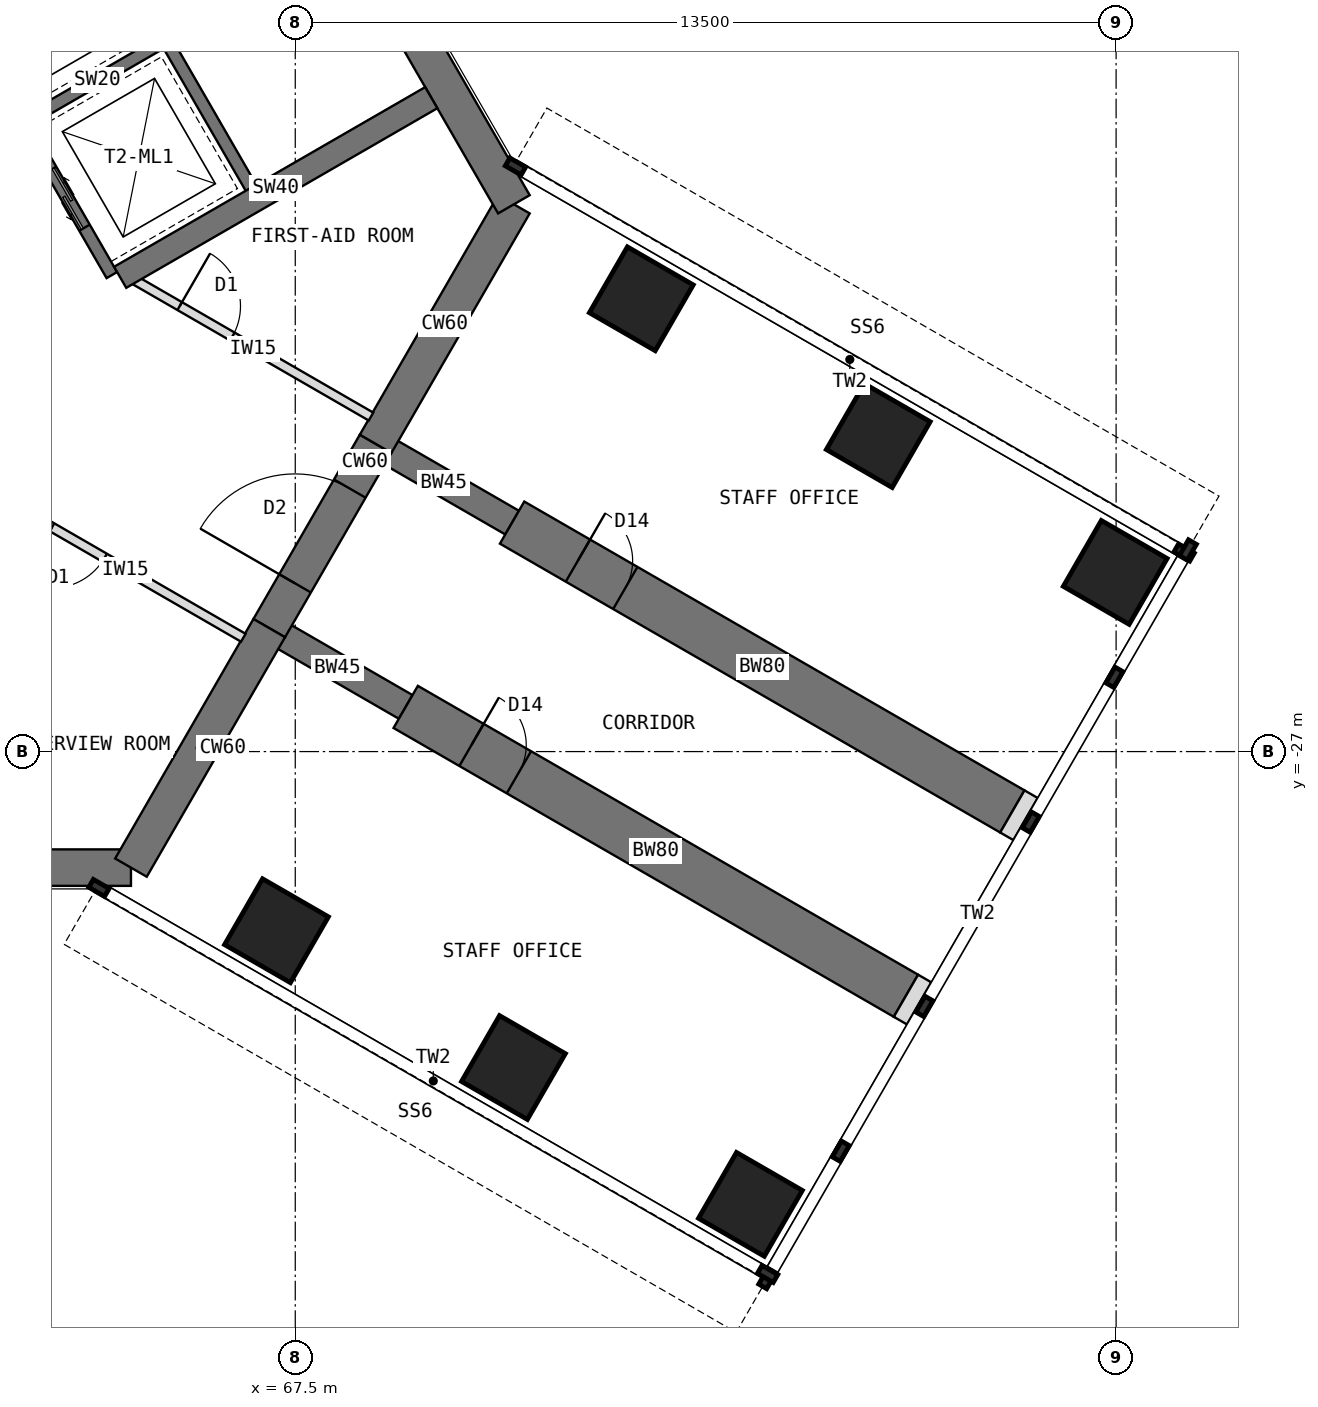
"""IFC4 building model, lengths in metres.
Left out: names, types, materials, properties, quantities, classifications, styles, units other than length and angle.
Written with IfcOpenShell. Run it as: python <this file> out.ifc"""

import sys

from ifc_helpers import new_model, si_unit, direction, frame, frame_2d, origin, origin_2d, place, context, subcontext, project, spatial, rectangle, extrude, element, fill, save


model = new_model("IFC4")
c1 = context("Model", 3, precision=1e-05, world=origin(), true_north=direction((0.0, 1.0)))
c2 = subcontext(c1, "Body", "Model", "MODEL_VIEW")
j1 = project(units=[si_unit("LENGTHUNIT", "METRE"), si_unit("PLANEANGLEUNIT", "RADIAN")], contexts=[c1])
p1 = place(None, origin())
s1 = spatial("IfcSite", under=j1, at=p1, CompositionType="ELEMENT")
p2 = place(p1, origin())
s2 = spatial("IfcBuilding", under=s1, at=p2, CompositionType="ELEMENT")
p3 = place(p2, frame((0.0, 0.0, 161.5)))
s3 = spatial("IfcBuildingStorey", under=s2, at=p3, CompositionType="ELEMENT", Elevation=161.5)
p4 = place(p3, frame((52.202, -28.908, 0.0), z_axis=(0.0, 0.0, 1.0), x_axis=(1.0, 0.0, 0.0)))
e1 = element("IfcWall", 1, at=p4, inside=s3, PredefinedType="SHEAR", context=c2, shape_type="SweptSolid", body=[
    extrude(rectangle(XDim=12.596, YDim=0.6, at=frame_2d((6.298, 0.0))), origin(), (0.0, 0.0, 1.0), 4.0),
])
p5 = place(p3, frame((64.798, -28.908, 0.0), z_axis=(0.0, 0.0, 1.0), x_axis=(0.499984222037, 0.866034513004, 0.0)))
e2 = element("IfcWall", 2, at=p5, inside=s3, PredefinedType="SHEAR", context=c2, shape_type="SweptSolid", body=[
    extrude(rectangle(XDim=4.548, YDim=0.6, at=frame_2d((2.274, 0.0))), origin(), (0.0, 0.0, 1.0), 4.0),
])
p6 = place(p3, frame((67.072, -24.97, 0.0), z_axis=(0.0, 0.0, 1.0), x_axis=(0.500010275428, 0.866019471182, 0.0)))
e3 = element("IfcWall", 3, at=p6, inside=s3, PredefinedType="SHEAR", context=c2, shape_type="SweptSolid", body=[
    extrude(rectangle(XDim=3.5, YDim=0.6, at=frame_2d((1.75, 0.0))), origin(), (0.0, 0.0, 1.0), 4.0),
])
p7 = place(p6, frame((0.85, 0.0, 0.0)))
e4 = element("IfcOpeningElement", 4, at=p7, cuts=e3, PredefinedType="OPENING", context=c2, shape_type="SweptSolid", body=[
    extrude(rectangle(XDim=1.8, YDim=2.1, at=frame_2d((0.9, 1.05))), frame((0.0, 0.31, 0.0), z_axis=(0.0, -1.0, 0.0), x_axis=(1.0, 0.0, 0.0)), (0.0, 0.0, 1.0), 0.62),
])
p8 = place(p3, frame((68.822, -21.939, 0.0), z_axis=(0.0, 0.0, 1.0), x_axis=(0.500024481964, 0.866011268655, 0.0)))
e5 = element("IfcWall", 5, at=p8, inside=s3, PredefinedType="SHEAR", context=c2, shape_type="SweptSolid", body=[
    extrude(rectangle(XDim=4.548, YDim=0.6, at=frame_2d((2.274, 0.0))), origin(), (0.0, 0.0, 1.0), 4.0),
])
p9 = place(p3, frame((71.096, -18.0, 0.0), z_axis=(0.0, 0.0, 1.0), x_axis=(-0.500005998175, 0.866021940709, 0.0)))
e6 = element("IfcWall", 6, at=p9, inside=s3, PredefinedType="SHEAR", context=c2, shape_type="SweptSolid", body=[
    extrude(rectangle(XDim=12.596, YDim=0.6, at=frame_2d((6.298, 0.0))), origin(), (0.0, 0.0, 1.0), 4.0),
])
p10 = place(p3, frame((68.822, -21.939, 0.0), z_axis=(0.0, 0.0, 1.0), x_axis=(0.866072649678, -0.499918158782, 0.0)))
e7 = element("IfcWall", 7, at=p10, inside=s3, PredefinedType="SHEAR", context=c2, shape_type="SweptSolid", body=[
    extrude(rectangle(XDim=2.592, YDim=0.45, at=frame_2d((1.296, 0.0))), origin(), (0.0, 0.0, 1.0), 4.0),
])
p11 = place(p3, frame((71.066, -23.234, 0.0), z_axis=(0.0, 0.0, 1.0), x_axis=(0.86602681393, -0.499997557548, 0.0)))
e8 = element("IfcWall", 8, at=p11, inside=s3, PredefinedType="SHEAR", context=c2, shape_type="SweptSolid", body=[
    extrude(rectangle(XDim=9.5, YDim=0.8, at=frame_2d((4.75, 0.0))), origin(), (0.0, 0.0, 1.0), 4.0),
])
p12 = place(p11, frame((1.25, 0.0, 0.0)))
e9 = element("IfcOpeningElement", 9, at=p12, cuts=e8, PredefinedType="OPENING", context=c2, shape_type="SweptSolid", body=[
    extrude(rectangle(XDim=0.9, YDim=2.1, at=frame_2d((0.45, 1.05))), frame((0.0, 0.41, 0.0), z_axis=(0.0, -1.0, 0.0), x_axis=(1.0, 0.0, 0.0)), (0.0, 0.0, 1.0), 0.82),
])
p13 = place(p3, frame((67.072, -24.97, 0.0), z_axis=(0.0, 0.0, 1.0), x_axis=(0.866031863473, -0.499988811324, 0.0)))
e10 = element("IfcWall", 10, at=p13, inside=s3, PredefinedType="SHEAR", context=c2, shape_type="SweptSolid", body=[
    extrude(rectangle(XDim=2.592, YDim=0.45, at=frame_2d((1.296, 0.0))), origin(), (0.0, 0.0, 1.0), 4.0),
])
p14 = place(p3, frame((69.316, -26.266, 0.0), z_axis=(0.0, 0.0, 1.0), x_axis=(0.86602681393, -0.499997557548, 0.0)))
e11 = element("IfcWall", 11, at=p14, inside=s3, PredefinedType="SHEAR", context=c2, shape_type="SweptSolid", body=[
    extrude(rectangle(XDim=9.5, YDim=0.8, at=frame_2d((4.75, 0.0))), origin(), (0.0, 0.0, 1.0), 4.0),
])
p15 = place(p14, frame((1.25, 0.0, 0.0)))
e12 = element("IfcOpeningElement", 12, at=p15, cuts=e11, PredefinedType="OPENING", context=c2, shape_type="SweptSolid", body=[
    extrude(rectangle(XDim=0.9, YDim=2.1, at=frame_2d((0.45, 1.05))), frame((0.0, 0.41, 0.0), z_axis=(0.0, -1.0, 0.0), x_axis=(1.0, 0.0, 0.0)), (0.0, 0.0, 1.0), 0.82),
])
for number, where, z_axis, x_axis in (
    (13, (73.191, -19.554, 0.0), (0.0, 0.0, 1.0), (0.5, 0.866, 0.0)),
    (14, (67.191, -29.946, 0.0), (0.0, 0.0, 1.0), (0.5, 0.866, 0.0)),
    (15, (77.088, -21.804, 0.0), (0.0, 0.0, 1.0), (0.5, 0.866, 0.0)),
    (16, (71.088, -32.196, 0.0), (0.0, 0.0, 1.0), (0.5, 0.866, 0.0)),
    (17, (80.986, -24.054, 0.0), (0.0, 0.0, 1.0), (0.5, 0.866, 0.0)),
    (18, (74.986, -34.446, 0.0), (0.0, 0.0, 1.0), (0.5, 0.866, 0.0)),
):
    element("IfcColumn", number, at=place(p3, frame(where, z_axis=z_axis, x_axis=x_axis)), inside=s3, PredefinedType="COLUMN", context=c2, shape_type="SweptSolid", body=[
        extrude(rectangle(XDim=1.25, YDim=1.25, at=origin_2d()), origin(), (0.0, 0.0, 1.0), 4.0),
    ])
for number, where, z_axis, x_axis in (
    (19, (79.294, -27.984, 0.0), (0.0, 0.0, 1.0), (0.866, -0.5, 0.0)),
    (20, (77.544, -31.016, 0.0), (0.0, 0.0, 1.0), (0.866, -0.5, 0.0)),
):
    element("IfcWall", number, at=place(p3, frame(where, z_axis=z_axis, x_axis=x_axis)), inside=s3, PredefinedType="PARTITIONING", context=c2, shape_type="SweptSolid", body=[
        extrude(rectangle(XDim=0.25, YDim=0.8, at=frame_2d((0.125, 0.0))), origin(), (0.0, 0.0, 1.0), 3.7),
    ])
p16 = place(p3, frame((64.484, -19.164, 0.0), z_axis=(0.0, 0.0, 1.0), x_axis=(-0.49999894854, 0.866026010844, 0.0)))
e21 = element("IfcWall", 21, at=p16, inside=s3, PredefinedType="SHEAR", context=c2, shape_type="SweptSolid", body=[
    extrude(rectangle(XDim=8.0, YDim=0.2, at=frame_2d((4.0, 0.0))), origin(), (0.0, 0.0, 1.0), 4.0),
])
p17 = place(p16, frame((6.3, 0.0, 0.0)))
e22 = element("IfcOpeningElement", 22, at=p17, cuts=e21, PredefinedType="OPENING", context=c2, shape_type="SweptSolid", body=[
    extrude(rectangle(XDim=1.2, YDim=2.1, at=frame_2d((0.6, 1.05))), frame((0.0, 0.11, 0.0), z_axis=(0.0, -1.0, 0.0), x_axis=(1.0, 0.0, 0.0)), (0.0, 0.0, 1.0), 0.22),
])
p18 = place(p16, frame((0.9, 0.0, 0.0)))
e23 = element("IfcOpeningElement", 23, at=p18, cuts=e21, PredefinedType="OPENING", context=c2, shape_type="SweptSolid", body=[
    extrude(rectangle(XDim=1.1, YDim=2.2, at=frame_2d((0.55, 1.1))), frame((0.0, 0.11, 0.0), z_axis=(0.0, -1.0, 0.0), x_axis=(1.0, 0.0, 0.0)), (0.0, 0.0, 1.0), 0.22),
])
p19 = place(p16, frame((3.8, 0.0, 0.0)))
e24 = element("IfcOpeningElement", 24, at=p19, cuts=e21, PredefinedType="OPENING", context=c2, shape_type="SweptSolid", body=[
    extrude(rectangle(XDim=1.1, YDim=2.2, at=frame_2d((0.55, 1.1))), frame((0.0, 0.11, 0.0), z_axis=(0.0, -1.0, 0.0), x_axis=(1.0, 0.0, 0.0)), (0.0, 0.0, 1.0), 0.22),
])
p20 = place(p3, frame((63.12, -16.603, 0.0), z_axis=(0.0, 0.0, 1.0), x_axis=(0.866062058628, 0.499936506574, 0.0)))
e25 = element("IfcWall", 25, at=p20, inside=s3, PredefinedType="SHEAR", context=c2, shape_type="SweptSolid", body=[
    extrude(rectangle(XDim=2.6, YDim=0.2, at=frame_2d((1.3, 0.0))), origin(), (0.0, 0.0, 1.0), 4.0),
])
p21 = place(p3, frame((66.822, -17.814, 0.0), z_axis=(0.0, 0.0, 1.0), x_axis=(-0.49999894854, 0.866026010844, 0.0)))
e26 = element("IfcWall", 26, at=p21, inside=s3, PredefinedType="SHEAR", context=c2, shape_type="SweptSolid", body=[
    extrude(rectangle(XDim=8.0, YDim=0.2, at=frame_2d((4.0, 0.0))), origin(), (0.0, 0.0, 1.0), 4.0),
])
p22 = place(p21, frame((6.7, 0.0, 0.0)))
e27 = element("IfcOpeningElement", 27, at=p22, cuts=e26, PredefinedType="OPENING", context=c2, shape_type="SweptSolid", body=[
    extrude(rectangle(XDim=1.1, YDim=2.1, at=frame_2d((0.55, 1.05))), frame((0.0, 0.11, 0.0), z_axis=(0.0, -1.0, 0.0), x_axis=(1.0, 0.0, 0.0)), (0.0, 0.0, 1.0), 0.22),
])
p23 = place(p3, frame((64.62, -19.201, 0.0), z_axis=(0.0, 0.0, 1.0), x_axis=(0.866027317282, 0.49999668571, 0.0)))
e28 = element("IfcWall", 28, at=p23, inside=s3, PredefinedType="SHEAR", context=c2, shape_type="SweptSolid", body=[
    extrude(rectangle(XDim=5.908, YDim=0.4, at=frame_2d((2.954, 0.0))), origin(), (0.0, 0.0, 1.0), 4.0),
])
p24 = place(p3, frame((64.87, -19.253, 0.0), z_axis=(0.0, 0.0, 1.0), x_axis=(0.866025707867, -0.499999473313, 0.0)))
e29 = element("IfcWall", 29, at=p24, inside=s3, PredefinedType="PARTITIONING", context=c2, shape_type="SweptSolid", body=[
    extrude(rectangle(XDim=4.476, YDim=0.15, at=frame_2d((2.238, 0.0))), origin(), (0.0, 0.0, 1.0), 3.7),
])
p25 = place(p24, frame((0.843, 0.0, 0.0)))
e30 = element("IfcOpeningElement", 30, at=p25, cuts=e29, PredefinedType="OPENING", context=c2, shape_type="SweptSolid", body=[
    extrude(rectangle(XDim=1.0, YDim=2.1, at=frame_2d((0.5, 1.05))), frame((0.0, 0.085, 0.0), z_axis=(0.0, -1.0, 0.0), x_axis=(1.0, 0.0, 0.0)), (0.0, 0.0, 1.0), 0.17),
])
p26 = place(p3, frame((66.646, -25.128, 0.0), z_axis=(0.0, 0.0, 1.0), x_axis=(-0.866025707867, 0.499999473313, 0.0)))
e31 = element("IfcWall", 31, at=p26, inside=s3, PredefinedType="PARTITIONING", context=c2, shape_type="SweptSolid", body=[
    extrude(rectangle(XDim=4.476, YDim=0.15, at=frame_2d((2.238, 0.0))), origin(), (0.0, 0.0, 1.0), 3.7),
])
p27 = place(p26, frame((2.633, 0.0, 0.0)))
e32 = element("IfcOpeningElement", 32, at=p27, cuts=e31, PredefinedType="OPENING", context=c2, shape_type="SweptSolid", body=[
    extrude(rectangle(XDim=1.0, YDim=2.1, at=frame_2d((0.5, 1.05))), frame((0.0, 0.085, 0.0), z_axis=(0.0, -1.0, 0.0), x_axis=(1.0, 0.0, 0.0)), (0.0, 0.0, 1.0), 0.17),
])
p28 = place(p18, origin())
e33 = element("IfcDoor", 33, at=p28, inside=s3, OperationType="DOUBLE_DOOR_SLIDING", PredefinedType="DOOR", context=c2, shape_type="SweptSolid", body=[
    extrude(rectangle(XDim=1.1, YDim=2.2, at=frame_2d((0.55, 1.1))), frame((0.0, 0.025, 0.0), z_axis=(0.0, -1.0, 0.0), x_axis=(1.0, 0.0, 0.0)), (0.0, 0.0, 1.0), 0.05),
])
fill(e23, e33)
p29 = place(p7, origin())
e34 = element("IfcDoor", 34, at=p29, inside=s3, OperationType="DOUBLE_DOOR_DOUBLE_SWING", PredefinedType="DOOR", context=c2, shape_type="SweptSolid", body=[
    extrude(rectangle(XDim=1.72, YDim=2.06, at=frame_2d((0.9, 1.03))), frame((0.0, 0.025, 0.0), z_axis=(0.0, -1.0, 0.0), x_axis=(1.0, 0.0, 0.0)), (0.0, 0.0, 1.0), 0.05),
    extrude(rectangle(XDim=0.04, YDim=2.1, at=frame_2d((0.02, 1.05))), frame((0.0, 0.3, 0.0), z_axis=(0.0, -1.0, 0.0), x_axis=(1.0, 0.0, 0.0)), (0.0, 0.0, 1.0), 0.6),
    extrude(rectangle(XDim=0.04, YDim=2.1, at=frame_2d((1.78, 1.05))), frame((0.0, 0.3, 0.0), z_axis=(0.0, -1.0, 0.0), x_axis=(1.0, 0.0, 0.0)), (0.0, 0.0, 1.0), 0.6),
    extrude(rectangle(XDim=1.72, YDim=0.04, at=frame_2d((0.9, 2.08))), frame((0.0, 0.3, 0.0), z_axis=(0.0, -1.0, 0.0), x_axis=(1.0, 0.0, 0.0)), (0.0, 0.0, 1.0), 0.6),
])
fill(e4, e34)
p30 = place(p27, origin())
e35 = element("IfcDoor", 35, at=p30, inside=s3, OperationType="SINGLE_SWING_RIGHT", PredefinedType="DOOR", context=c2, shape_type="SweptSolid", body=[
    extrude(rectangle(XDim=1.0, YDim=2.1, at=frame_2d((0.5, 1.05))), frame((0.0, 0.025, 0.0), z_axis=(0.0, -1.0, 0.0), x_axis=(1.0, 0.0, 0.0)), (0.0, 0.0, 1.0), 0.05),
])
fill(e32, e35)
p31 = place(p25, origin())
e36 = element("IfcDoor", 36, at=p31, inside=s3, OperationType="SINGLE_SWING_LEFT", PredefinedType="DOOR", context=c2, shape_type="SweptSolid", body=[
    extrude(rectangle(XDim=1.0, YDim=2.1, at=frame_2d((0.5, 1.05))), frame((0.0, 0.025, 0.0), z_axis=(0.0, -1.0, 0.0), x_axis=(1.0, 0.0, 0.0)), (0.0, 0.0, 1.0), 0.05),
])
fill(e30, e36)
p32 = place(p12, origin())
e37 = element("IfcDoor", 37, at=p32, inside=s3, OperationType="SINGLE_SWING_LEFT", PredefinedType="DOOR", context=c2, shape_type="SweptSolid", body=[
    extrude(rectangle(XDim=0.82, YDim=2.06, at=frame_2d((0.45, 1.03))), frame((0.0, 0.025, 0.0), z_axis=(0.0, -1.0, 0.0), x_axis=(1.0, 0.0, 0.0)), (0.0, 0.0, 1.0), 0.05),
    extrude(rectangle(XDim=0.04, YDim=2.1, at=frame_2d((0.02, 1.05))), frame((0.0, 0.4, 0.0), z_axis=(0.0, -1.0, 0.0), x_axis=(1.0, 0.0, 0.0)), (0.0, 0.0, 1.0), 0.8),
    extrude(rectangle(XDim=0.04, YDim=2.1, at=frame_2d((0.88, 1.05))), frame((0.0, 0.4, 0.0), z_axis=(0.0, -1.0, 0.0), x_axis=(1.0, 0.0, 0.0)), (0.0, 0.0, 1.0), 0.8),
    extrude(rectangle(XDim=0.82, YDim=0.04, at=frame_2d((0.45, 2.08))), frame((0.0, 0.4, 0.0), z_axis=(0.0, -1.0, 0.0), x_axis=(1.0, 0.0, 0.0)), (0.0, 0.0, 1.0), 0.8),
])
fill(e9, e37)
p33 = place(p15, origin())
e38 = element("IfcDoor", 38, at=p33, inside=s3, OperationType="SINGLE_SWING_LEFT", PredefinedType="DOOR", context=c2, shape_type="SweptSolid", body=[
    extrude(rectangle(XDim=0.82, YDim=2.06, at=frame_2d((0.45, 1.03))), frame((0.0, 0.025, 0.0), z_axis=(0.0, -1.0, 0.0), x_axis=(1.0, 0.0, 0.0)), (0.0, 0.0, 1.0), 0.05),
    extrude(rectangle(XDim=0.04, YDim=2.1, at=frame_2d((0.02, 1.05))), frame((0.0, 0.4, 0.0), z_axis=(0.0, -1.0, 0.0), x_axis=(1.0, 0.0, 0.0)), (0.0, 0.0, 1.0), 0.8),
    extrude(rectangle(XDim=0.04, YDim=2.1, at=frame_2d((0.88, 1.05))), frame((0.0, 0.4, 0.0), z_axis=(0.0, -1.0, 0.0), x_axis=(1.0, 0.0, 0.0)), (0.0, 0.0, 1.0), 0.8),
    extrude(rectangle(XDim=0.82, YDim=0.04, at=frame_2d((0.45, 2.08))), frame((0.0, 0.4, 0.0), z_axis=(0.0, -1.0, 0.0), x_axis=(1.0, 0.0, 0.0)), (0.0, 0.0, 1.0), 0.8),
])
fill(e12, e38)
save(model, sys.argv[1])
